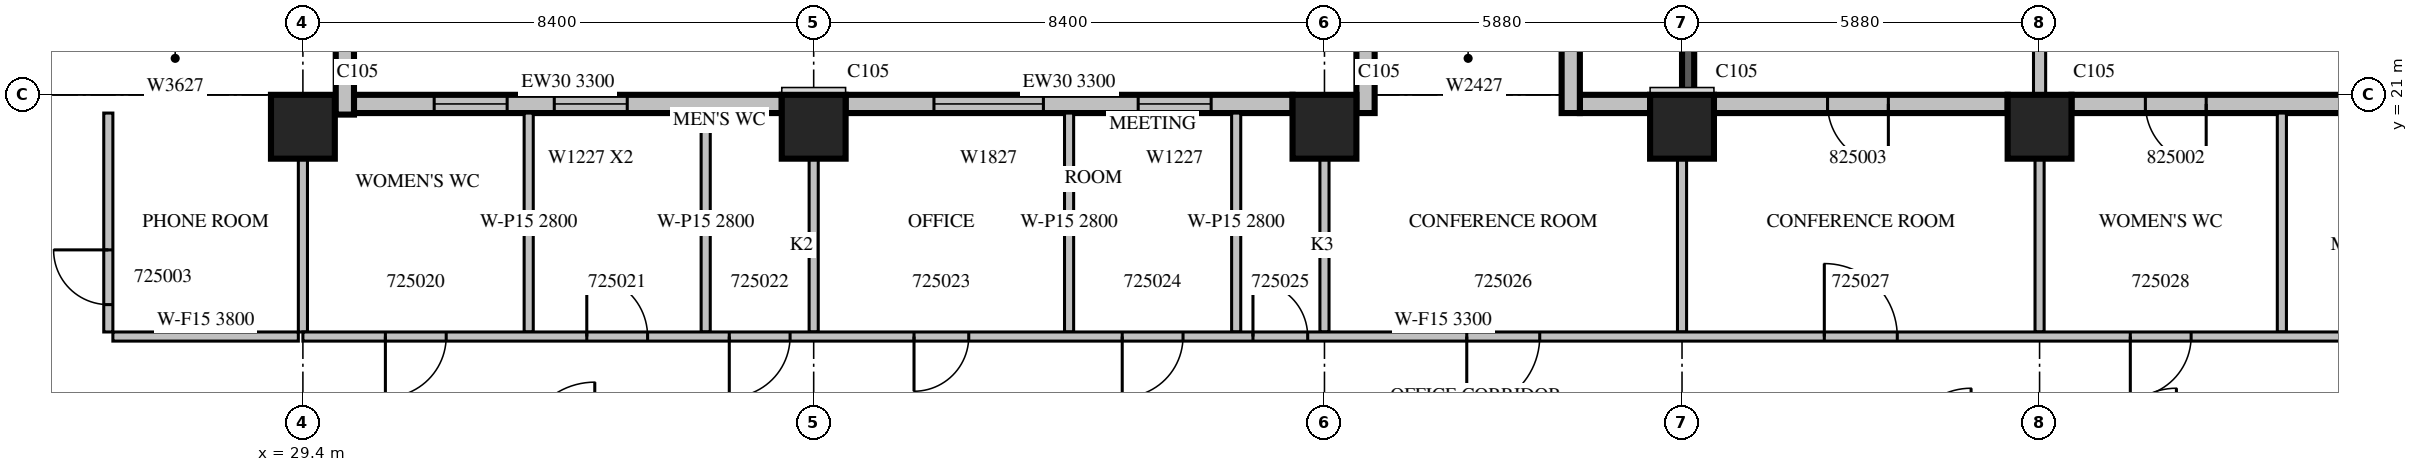
"""IFC4 building model, lengths in metres.
Left out: names, types, materials, properties, quantities, classifications, styles, units other than length and angle.
Written with IfcOpenShell. Run it as: python <this file> out.ifc"""

import sys

from ifc_helpers import new_model, si_unit, direction, frame, frame_2d, origin, origin_2d, place, context, subcontext, project, spatial, rectangle, extrude, source, transform, mapped, element, fill, save


model = new_model("IFC4")
c1 = context("Model", 3, precision=1e-05, world=origin(), true_north=direction((0.0, 1.0)))
c2 = subcontext(c1, "Body", "Model", "MODEL_VIEW")
j1 = project(units=[si_unit("LENGTHUNIT", "METRE"), si_unit("PLANEANGLEUNIT", "RADIAN")], contexts=[c1])
p1 = place(None, origin())
s1 = spatial("IfcSite", under=j1, at=p1, CompositionType="ELEMENT")
p2 = place(p1, origin())
s2 = spatial("IfcBuilding", under=s1, at=p2, CompositionType="ELEMENT")
p3 = place(p2, frame((0.0, 0.0, 116.1)))
s3 = spatial("IfcBuildingStorey", under=s2, at=p3, CompositionType="ELEMENT", Elevation=116.1)
m1 = source(origin(), c2, "Body", "SweptSolid", [
    extrude(rectangle(XDim=1.05, YDim=1.05, at=origin_2d()), origin(), (0.0, 0.0, 1.0), 4.2),
])
for number, where, z_axis, x_axis in (
    (1, (29.4, 20.475, 0.0), (0.0, 0.0, 1.0), (1.0, 0.0, 0.0)),
    (2, (37.8, 20.475, 0.0), (0.0, 0.0, 1.0), (1.0, 0.0, 0.0)),
    (3, (46.2, 20.475, 0.0), (0.0, 0.0, 1.0), (1.0, 0.0, 0.0)),
    (4, (52.08, 20.475, 0.0), (0.0, 0.0, 1.0), (1.0, 0.0, 0.0)),
    (5, (57.96, 20.475, 0.0), (0.0, 0.0, 1.0), (1.0, 0.0, 0.0)),
):
    element("IfcColumn", number, at=place(p3, frame(where, z_axis=z_axis, x_axis=x_axis)), inside=s3, PredefinedType="COLUMN", context=c2, shape_type="MappedRepresentation", body=[
        mapped(m1, transform((0.0, 0.0, 0.0), scale=1.0)),
    ])
m2 = source(origin(), c2, "Body", "SweptSolid", [
    extrude(rectangle(XDim=3.9, YDim=0.2, at=frame_2d((1.95, 0.0))), origin(), (0.0, 0.0, 1.0), 3.79),
])
p4 = place(p3, frame((57.96, 21.0, 0.0), z_axis=(0.0, 0.0, 1.0), x_axis=(0.0, 1.0, 0.0)))
e6 = element("IfcWall", 6, at=p4, inside=s3, PredefinedType="SOLIDWALL", context=c2, shape_type="MappedRepresentation", body=[
    mapped(m2, transform((0.0, 0.0, 0.0), scale=1.0)),
])
m3 = source(origin(), c2, "Body", "SweptSolid", [
    extrude(rectangle(XDim=3.9, YDim=0.2, at=frame_2d((1.95, 0.0))), origin(), (0.0, 0.0, 1.0), 3.79),
])
p5 = place(p3, frame((52.18, 21.0, 0.0), z_axis=(0.0, 0.0, 1.0), x_axis=(0.0, 1.0, 0.0)))
e7 = element("IfcWall", 7, at=p5, inside=s3, PredefinedType="SOLIDWALL", context=c2, shape_type="MappedRepresentation", body=[
    mapped(m3, transform((0.0, 0.0, 0.0), scale=1.0)),
])
m4 = source(origin(), c2, "Body", "SweptSolid", [
    extrude(rectangle(XDim=2.4, YDim=2.7, at=frame_2d((1.2, 1.35))), frame((0.0, 0.11, 0.0), z_axis=(0.0, -1.0, 0.0), x_axis=(1.0, 0.0, 0.0)), (0.0, 0.0, 1.0), 0.22),
])
p6 = place(p5, frame((0.75, 0.0, 0.6)))
e8 = element("IfcOpeningElement", 8, at=p6, cuts=e7, PredefinedType="OPENING", context=c2, shape_type="MappedRepresentation", body=[
    mapped(m4, transform((0.0, 0.0, 0.0), scale=1.0)),
])
m5 = source(origin(), c2, "Body", "SweptSolid", [
    extrude(rectangle(XDim=4.83, YDim=0.3, at=frame_2d((2.415, 0.0))), origin(), (0.0, 0.0, 1.0), 3.8),
])
p7 = place(p3, frame((63.315, 20.85, 0.0), z_axis=(0.0, 0.0, 1.0), x_axis=(-1.0, 0.0, 0.0)))
e9 = element("IfcWall", 9, at=p7, inside=s3, PredefinedType="STANDARD", context=c2, shape_type="MappedRepresentation", body=[
    mapped(m5, transform((0.0, 0.0, 0.0), scale=1.0)),
])
m6 = source(origin(), c2, "Body", "SweptSolid", [
    extrude(rectangle(XDim=1.0, YDim=2.1, at=frame_2d((0.5, 1.05))), frame((0.0, 0.16, 0.0), z_axis=(0.0, -1.0, 0.0), x_axis=(1.0, 0.0, 0.0)), (0.0, 0.0, 1.0), 0.32),
])
p8 = place(p7, frame((2.615, 0.0, 0.0)))
e10 = element("IfcOpeningElement", 10, at=p8, cuts=e9, PredefinedType="OPENING", context=c2, shape_type="MappedRepresentation", body=[
    mapped(m6, transform((0.0, 0.0, 0.0), scale=1.0)),
])
p9 = place(p3, frame((57.435, 20.85, 0.0), z_axis=(0.0, 0.0, 1.0), x_axis=(-1.0, 0.0, 0.0)))
e11 = element("IfcWall", 11, at=p9, inside=s3, PredefinedType="STANDARD", context=c2, shape_type="MappedRepresentation", body=[
    mapped(m5, transform((0.0, 0.0, 0.0), scale=1.0)),
])
p10 = place(p9, frame((1.962, 0.0, 0.0)))
e12 = element("IfcOpeningElement", 12, at=p10, cuts=e11, PredefinedType="OPENING", context=c2, shape_type="MappedRepresentation", body=[
    mapped(m6, transform((0.0, 0.0, 0.0), scale=1.0)),
])
p11 = place(p3, frame((51.555, 20.85, 0.0), z_axis=(0.0, 0.0, 1.0), x_axis=(-1.0, 0.0, 0.0)))
e13 = element("IfcWall", 13, at=p11, inside=s3, PredefinedType="STANDARD", context=c2, shape_type="SweptSolid", body=[
    extrude(rectangle(XDim=1.155, YDim=0.3, at=frame_2d((0.578, 0.0))), origin(), (0.0, 0.0, 1.0), 3.8),
])
m7 = source(origin(), c2, "Body", "SweptSolid", [
    extrude(rectangle(XDim=1.2, YDim=0.3, at=frame_2d((0.6, 0.0))), origin(), (0.0, 0.0, 1.0), 3.8),
])
for number, where, z_axis, x_axis in (
    (14, (50.25, 20.7, 0.0), (0.0, 0.0, 1.0), (0.0, 1.0, 0.0)),
    (15, (46.875, 20.7, 0.0), (0.0, 0.0, 1.0), (0.0, 1.0, 0.0)),
):
    element("IfcWall", number, at=place(p3, frame(where, z_axis=z_axis, x_axis=x_axis)), inside=s3, PredefinedType="STANDARD", context=c2, shape_type="MappedRepresentation", body=[
        mapped(m7, transform((0.0, 0.0, 0.0), scale=1.0)),
    ])
m8 = source(origin(), c2, "Body", "SweptSolid", [
    extrude(rectangle(XDim=7.35, YDim=0.3, at=frame_2d((3.675, 0.0))), origin(), (0.0, 0.0, 1.0), 3.3),
])
p12 = place(p3, frame((45.675, 20.85, 0.0), z_axis=(0.0, 0.0, 1.0), x_axis=(-1.0, 0.0, 0.0)))
e16 = element("IfcWall", 16, at=p12, inside=s3, PredefinedType="STANDARD", context=c2, shape_type="MappedRepresentation", body=[
    mapped(m8, transform((0.0, 0.0, 0.0), scale=1.0)),
])
m9 = source(origin(), c2, "Body", "SweptSolid", [
    extrude(rectangle(XDim=1.2, YDim=2.7, at=frame_2d((0.6, 1.35))), frame((0.0, 0.16, 0.0), z_axis=(0.0, -1.0, 0.0), x_axis=(1.0, 0.0, 0.0)), (0.0, 0.0, 1.0), 0.32),
])
p13 = place(p12, frame((1.339, 0.0, 0.6)))
e17 = element("IfcOpeningElement", 17, at=p13, cuts=e16, PredefinedType="OPENING", context=c2, shape_type="MappedRepresentation", body=[
    mapped(m9, transform((0.0, 0.0, 0.0), scale=1.0)),
])
m10 = source(origin(), c2, "Body", "SweptSolid", [
    extrude(rectangle(XDim=1.8, YDim=2.7, at=frame_2d((0.9, 1.35))), frame((0.0, 0.16, 0.0), z_axis=(0.0, -1.0, 0.0), x_axis=(1.0, 0.0, 0.0)), (0.0, 0.0, 1.0), 0.32),
])
p14 = place(p12, frame((4.097, 0.0, 0.6)))
e18 = element("IfcOpeningElement", 18, at=p14, cuts=e16, PredefinedType="OPENING", context=c2, shape_type="MappedRepresentation", body=[
    mapped(m10, transform((0.0, 0.0, 0.0), scale=1.0)),
])
p15 = place(p3, frame((37.275, 20.85, 0.0), z_axis=(0.0, 0.0, 1.0), x_axis=(-1.0, 0.0, 0.0)))
e19 = element("IfcWall", 19, at=p15, inside=s3, PredefinedType="STANDARD", context=c2, shape_type="SweptSolid", body=[
    extrude(rectangle(XDim=7.035, YDim=0.3, at=frame_2d((3.518, 0.0))), origin(), (0.0, 0.0, 1.0), 3.3),
])
p16 = place(p15, frame((2.541, 0.0, 0.6)))
e20 = element("IfcOpeningElement", 20, at=p16, cuts=e19, PredefinedType="OPENING", context=c2, shape_type="MappedRepresentation", body=[
    mapped(m9, transform((0.0, 0.0, 0.0), scale=1.0)),
])
p17 = place(p15, frame((4.516, 0.0, 0.6)))
e21 = element("IfcOpeningElement", 21, at=p17, cuts=e19, PredefinedType="OPENING", context=c2, shape_type="MappedRepresentation", body=[
    mapped(m9, transform((0.0, 0.0, 0.0), scale=1.0)),
])
p18 = place(p3, frame((30.09, 20.675, 0.0), z_axis=(0.0, 0.0, 1.0), x_axis=(0.0, 1.0, 0.0)))
e22 = element("IfcWall", 22, at=p18, inside=s3, PredefinedType="STANDARD", context=c2, shape_type="SweptSolid", body=[
    extrude(rectangle(XDim=1.225, YDim=0.3, at=frame_2d((0.613, 0.0))), origin(), (0.0, 0.0, 1.0), 3.8),
])
m11 = source(origin(), c2, "Body", "SweptSolid", [
    extrude(rectangle(XDim=3.6, YDim=0.15, at=frame_2d((1.8, 0.0))), origin(), (0.0, 0.0, 1.0), 3.8),
])
p19 = place(p3, frame((26.2, 20.7, 0.0), z_axis=(0.0, 0.0, 1.0), x_axis=(0.0, -1.0, 0.0)))
e23 = element("IfcWall", 23, at=p19, inside=s3, PredefinedType="PARTITIONING", context=c2, shape_type="MappedRepresentation", body=[
    mapped(m11, transform((0.0, 0.0, 0.0), scale=1.0)),
])
m12 = source(origin(), c2, "Body", "SweptSolid", [
    extrude(rectangle(XDim=0.9, YDim=2.1, at=frame_2d((0.45, 1.05))), frame((0.0, 0.085, 0.0), z_axis=(0.0, -1.0, 0.0), x_axis=(1.0, 0.0, 0.0)), (0.0, 0.0, 1.0), 0.17),
])
p20 = place(p19, frame((2.25, 0.0, 0.0)))
e24 = element("IfcOpeningElement", 24, at=p20, cuts=e23, PredefinedType="OPENING", context=c2, shape_type="MappedRepresentation", body=[
    mapped(m12, transform((0.0, 0.0, 0.0), scale=1.0)),
])
m13 = source(origin(), c2, "Body", "SweptSolid", [
    extrude(rectangle(XDim=3.05, YDim=0.15, at=frame_2d((1.525, 0.0))), origin(), (0.0, 0.0, 1.0), 3.8),
])
p21 = place(p3, frame((26.275, 17.025, 0.0), z_axis=(0.0, 0.0, 1.0), x_axis=(1.0, 0.0, 0.0)))
e25 = element("IfcWall", 25, at=p21, inside=s3, PredefinedType="PARTITIONING", context=c2, shape_type="MappedRepresentation", body=[
    mapped(m13, transform((0.0, 0.0, 0.0), scale=1.0)),
])
m14 = source(origin(), c2, "Body", "SweptSolid", [
    extrude(rectangle(XDim=2.851, YDim=0.15, at=frame_2d((1.425, 0.0))), origin(), (0.0, 0.0, 1.0), 3.8),
])
p22 = place(p3, frame((29.4, 17.1, 0.0), z_axis=(0.0, 0.0, 1.0), x_axis=(0.0, 1.0, 0.0)))
e26 = element("IfcWall", 26, at=p22, inside=s3, PredefinedType="PARTITIONING", context=c2, shape_type="MappedRepresentation", body=[
    mapped(m14, transform((0.0, 0.0, 0.0), scale=1.0)),
])
m15 = source(origin(), c2, "Body", "SweptSolid", [
    extrude(rectangle(XDim=3.6, YDim=0.15, at=frame_2d((1.8, 0.0))), origin(), (0.0, 0.0, 1.0), 2.8),
])
for number, where, z_axis, x_axis in (
    (27, (33.113, 20.7, 0.0), (0.0, 0.0, 1.0), (0.0, -1.0, 0.0)),
    (28, (36.024, 20.7, 0.0), (0.0, 0.0, 1.0), (0.0, -1.0, 0.0)),
    (29, (44.748, 20.7, 0.0), (0.0, 0.0, 1.0), (0.0, -1.0, 0.0)),
):
    element("IfcWall", number, at=place(p3, frame(where, z_axis=z_axis, x_axis=x_axis)), inside=s3, PredefinedType="PARTITIONING", context=c2, shape_type="MappedRepresentation", body=[
        mapped(m15, transform((0.0, 0.0, 0.0), scale=1.0)),
    ])
p23 = place(p3, frame((52.08, 19.951, 0.0), z_axis=(0.0, 0.0, 1.0), x_axis=(0.0, -1.0, 0.0)))
e30 = element("IfcWall", 30, at=p23, inside=s3, PredefinedType="PARTITIONING", context=c2, shape_type="MappedRepresentation", body=[
    mapped(m14, transform((0.0, 0.0, 0.0), scale=1.0)),
])
p24 = place(p3, frame((61.944, 20.7, 0.0), z_axis=(0.0, 0.0, 1.0), x_axis=(0.0, -1.0, 0.0)))
e31 = element("IfcWall", 31, at=p24, inside=s3, PredefinedType="PARTITIONING", context=c2, shape_type="MappedRepresentation", body=[
    mapped(m11, transform((0.0, 0.0, 0.0), scale=1.0)),
])
p25 = place(p3, frame((37.8, 17.1, 0.0), z_axis=(0.0, 0.0, 1.0), x_axis=(0.0, 1.0, 0.0)))
e32 = element("IfcWall", 32, at=p25, inside=s3, PredefinedType="PARTITIONING", context=c2, shape_type="MappedRepresentation", body=[
    mapped(m14, transform((0.0, 0.0, 0.0), scale=1.0)),
])
p26 = place(p3, frame((42.0, 17.1, 0.0), z_axis=(0.0, 0.0, 1.0), x_axis=(0.0, 1.0, 0.0)))
e33 = element("IfcWall", 33, at=p26, inside=s3, PredefinedType="PARTITIONING", context=c2, shape_type="MappedRepresentation", body=[
    mapped(m15, transform((0.0, 0.0, 0.0), scale=1.0)),
])
for number, where, z_axis, x_axis in (
    (34, (46.2, 17.1, 0.0), (0.0, 0.0, 1.0), (0.0, 1.0, 0.0)),
    (35, (57.96, 17.1, 0.0), (0.0, 0.0, 1.0), (0.0, 1.0, 0.0)),
):
    element("IfcWall", number, at=place(p3, frame(where, z_axis=z_axis, x_axis=x_axis)), inside=s3, PredefinedType="PARTITIONING", context=c2, shape_type="MappedRepresentation", body=[
        mapped(m14, transform((0.0, 0.0, 0.0), scale=1.0)),
    ])
m16 = source(origin(), c2, "Body", "SweptSolid", [
    extrude(rectangle(XDim=37.5, YDim=0.15, at=frame_2d((18.75, 0.0))), origin(), (0.0, 0.0, 1.0), 3.3),
])
p27 = place(p3, frame((29.4, 17.025, 0.0), z_axis=(0.0, 0.0, 1.0), x_axis=(1.0, 0.0, 0.0)))
e36 = element("IfcWall", 36, at=p27, inside=s3, PredefinedType="PARTITIONING", context=c2, shape_type="MappedRepresentation", body=[
    mapped(m16, transform((0.0, 0.0, 0.0), scale=1.0)),
])
m17 = source(origin(), c2, "Body", "SweptSolid", [
    extrude(rectangle(XDim=1.0, YDim=2.1, at=frame_2d((0.5, 1.05))), frame((0.0, 0.085, 0.0), z_axis=(0.0, -1.0, 0.0), x_axis=(1.0, 0.0, 0.0)), (0.0, 0.0, 1.0), 0.17),
])
p28 = place(p27, frame((1.357, 0.0, 0.0)))
e37 = element("IfcOpeningElement", 37, at=p28, cuts=e36, PredefinedType="OPENING", context=c2, shape_type="MappedRepresentation", body=[
    mapped(m17, transform((0.0, 0.0, 0.0), scale=1.0)),
])
p29 = place(p27, frame((4.669, 0.0, 0.0)))
e38 = element("IfcOpeningElement", 38, at=p29, cuts=e36, PredefinedType="OPENING", context=c2, shape_type="MappedRepresentation", body=[
    mapped(m17, transform((0.0, 0.0, 0.0), scale=1.0)),
])
p30 = place(p27, frame((7.012, 0.0, 0.0)))
e39 = element("IfcOpeningElement", 39, at=p30, cuts=e36, PredefinedType="OPENING", context=c2, shape_type="MappedRepresentation", body=[
    mapped(m17, transform((0.0, 0.0, 0.0), scale=1.0)),
])
p31 = place(p27, frame((10.05, 0.0, 0.0)))
e40 = element("IfcOpeningElement", 40, at=p31, cuts=e36, PredefinedType="OPENING", context=c2, shape_type="MappedRepresentation", body=[
    mapped(m12, transform((0.0, 0.0, 0.0), scale=1.0)),
])
p32 = place(p27, frame((13.474, 0.0, 0.0)))
e41 = element("IfcOpeningElement", 41, at=p32, cuts=e36, PredefinedType="OPENING", context=c2, shape_type="MappedRepresentation", body=[
    mapped(m17, transform((0.0, 0.0, 0.0), scale=1.0)),
])
p33 = place(p27, frame((15.624, 0.0, 0.0)))
e42 = element("IfcOpeningElement", 42, at=p33, cuts=e36, PredefinedType="OPENING", context=c2, shape_type="MappedRepresentation", body=[
    mapped(m12, transform((0.0, 0.0, 0.0), scale=1.0)),
])
m18 = source(origin(), c2, "Body", "SweptSolid", [
    extrude(rectangle(XDim=1.2, YDim=2.1, at=frame_2d((0.6, 1.05))), frame((0.0, 0.085, 0.0), z_axis=(0.0, -1.0, 0.0), x_axis=(1.0, 0.0, 0.0)), (0.0, 0.0, 1.0), 0.17),
])
p34 = place(p27, frame((19.14, 0.0, 0.0)))
e43 = element("IfcOpeningElement", 43, at=p34, cuts=e36, PredefinedType="OPENING", context=c2, shape_type="MappedRepresentation", body=[
    mapped(m18, transform((0.0, 0.0, 0.0), scale=1.0)),
])
p35 = place(p27, frame((25.02, 0.0, 0.0)))
e44 = element("IfcOpeningElement", 44, at=p35, cuts=e36, PredefinedType="OPENING", context=c2, shape_type="MappedRepresentation", body=[
    mapped(m18, transform((0.0, 0.0, 0.0), scale=1.0)),
])
p36 = place(p27, frame((30.052, 0.0, 0.0)))
e45 = element("IfcOpeningElement", 45, at=p36, cuts=e36, PredefinedType="OPENING", context=c2, shape_type="MappedRepresentation", body=[
    mapped(m17, transform((0.0, 0.0, 0.0), scale=1.0)),
])
p37 = place(p27, frame((33.608, 0.0, 0.0)))
e46 = element("IfcOpeningElement", 46, at=p37, cuts=e36, PredefinedType="OPENING", context=c2, shape_type="MappedRepresentation", body=[
    mapped(m17, transform((0.0, 0.0, 0.0), scale=1.0)),
])
p38 = place(p27, frame((36.124, 0.0, 0.0)))
e47 = element("IfcOpeningElement", 47, at=p38, cuts=e36, PredefinedType="OPENING", context=c2, shape_type="MappedRepresentation", body=[
    mapped(m17, transform((0.0, 0.0, 0.0), scale=1.0)),
])
m19 = source(origin(), c2, "Body", "SweptSolid", [
    extrude(rectangle(XDim=1.2, YDim=2.7, at=frame_2d((0.6, 1.35))), frame((0.0, 0.03, 0.0), z_axis=(0.0, -1.0, 0.0), x_axis=(1.0, 0.0, 0.0)), (0.0, 0.0, 1.0), 0.06),
])
p39 = place(p13, origin())
e48 = element("IfcWindow", 48, at=p39, inside=s3, PartitioningType="SINGLE_PANEL", PredefinedType="WINDOW", context=c2, shape_type="MappedRepresentation", body=[
    mapped(m19, transform((0.0, 0.0, 0.0), scale=1.0)),
])
fill(e17, e48)
p40 = place(p16, origin())
e49 = element("IfcWindow", 49, at=p40, inside=s3, PartitioningType="SINGLE_PANEL", PredefinedType="WINDOW", context=c2, shape_type="MappedRepresentation", body=[
    mapped(m19, transform((0.0, 0.0, 0.0), scale=1.0)),
])
fill(e20, e49)
p41 = place(p17, origin())
e50 = element("IfcWindow", 50, at=p41, inside=s3, PartitioningType="SINGLE_PANEL", PredefinedType="WINDOW", context=c2, shape_type="MappedRepresentation", body=[
    mapped(m19, transform((0.0, 0.0, 0.0), scale=1.0)),
])
fill(e21, e50)
m20 = source(origin(), c2, "Body", "SweptSolid", [
    extrude(rectangle(XDim=1.8, YDim=2.7, at=frame_2d((0.9, 1.35))), frame((0.0, 0.03, 0.0), z_axis=(0.0, -1.0, 0.0), x_axis=(1.0, 0.0, 0.0)), (0.0, 0.0, 1.0), 0.06),
])
p42 = place(p14, origin())
e51 = element("IfcWindow", 51, at=p42, inside=s3, PartitioningType="SINGLE_PANEL", PredefinedType="WINDOW", context=c2, shape_type="MappedRepresentation", body=[
    mapped(m20, transform((0.0, 0.0, 0.0), scale=1.0)),
])
fill(e18, e51)
m21 = source(origin(), c2, "Body", "SweptSolid", [
    extrude(rectangle(XDim=0.9, YDim=2.1, at=frame_2d((0.45, 1.05))), frame((0.0, 0.025, 0.0), z_axis=(0.0, -1.0, 0.0), x_axis=(1.0, 0.0, 0.0)), (0.0, 0.0, 1.0), 0.05),
])
p43 = place(p20, origin())
e52 = element("IfcDoor", 52, at=p43, inside=s3, OperationType="SINGLE_SWING_RIGHT", PredefinedType="DOOR", context=c2, shape_type="MappedRepresentation", body=[
    mapped(m21, transform((0.0, 0.0, 0.0), scale=1.0)),
])
fill(e24, e52)
m22 = source(origin(), c2, "Body", "SweptSolid", [
    extrude(rectangle(XDim=1.0, YDim=2.1, at=frame_2d((0.5, 1.05))), frame((0.0, 0.025, 0.0), z_axis=(0.0, -1.0, 0.0), x_axis=(1.0, 0.0, 0.0)), (0.0, 0.0, 1.0), 0.05),
])
p44 = place(p28, origin())
e53 = element("IfcDoor", 53, at=p44, inside=s3, OperationType="SINGLE_SWING_RIGHT", PredefinedType="DOOR", context=c2, shape_type="MappedRepresentation", body=[
    mapped(m22, transform((0.0, 0.0, 0.0), scale=1.0)),
])
fill(e37, e53)
p45 = place(p29, origin())
e54 = element("IfcDoor", 54, at=p45, inside=s3, OperationType="SINGLE_SWING_LEFT", PredefinedType="DOOR", context=c2, shape_type="MappedRepresentation", body=[
    mapped(m22, transform((0.0, 0.0, 0.0), scale=1.0)),
])
fill(e38, e54)
p46 = place(p30, origin())
e55 = element("IfcDoor", 55, at=p46, inside=s3, OperationType="SINGLE_SWING_RIGHT", PredefinedType="DOOR", context=c2, shape_type="MappedRepresentation", body=[
    mapped(m22, transform((0.0, 0.0, 0.0), scale=1.0)),
])
fill(e39, e55)
p47 = place(p31, origin())
e56 = element("IfcDoor", 56, at=p47, inside=s3, OperationType="SINGLE_SWING_RIGHT", PredefinedType="DOOR", context=c2, shape_type="MappedRepresentation", body=[
    mapped(m21, transform((0.0, 0.0, 0.0), scale=1.0)),
])
fill(e40, e56)
p48 = place(p32, origin())
e57 = element("IfcDoor", 57, at=p48, inside=s3, OperationType="SINGLE_SWING_RIGHT", PredefinedType="DOOR", context=c2, shape_type="MappedRepresentation", body=[
    mapped(m22, transform((0.0, 0.0, 0.0), scale=1.0)),
])
fill(e41, e57)
p49 = place(p33, origin())
e58 = element("IfcDoor", 58, at=p49, inside=s3, OperationType="SINGLE_SWING_LEFT", PredefinedType="DOOR", context=c2, shape_type="MappedRepresentation", body=[
    mapped(m21, transform((0.0, 0.0, 0.0), scale=1.0)),
])
fill(e42, e58)
m23 = source(origin(), c2, "Body", "SweptSolid", [
    extrude(rectangle(XDim=1.2, YDim=2.1, at=frame_2d((0.6, 1.05))), frame((0.0, 0.025, 0.0), z_axis=(0.0, -1.0, 0.0), x_axis=(1.0, 0.0, 0.0)), (0.0, 0.0, 1.0), 0.05),
])
p50 = place(p34, origin())
e59 = element("IfcDoor", 59, at=p50, inside=s3, OperationType="SINGLE_SWING_RIGHT", PredefinedType="DOOR", context=c2, shape_type="MappedRepresentation", body=[
    mapped(m23, transform((0.0, 0.0, 0.0), scale=1.0)),
])
fill(e43, e59)
p51 = place(p35, origin())
e60 = element("IfcDoor", 60, at=p51, inside=s3, OperationType="SINGLE_SWING_LEFT", PredefinedType="DOOR", context=c2, shape_type="MappedRepresentation", body=[
    mapped(m23, transform((0.0, 0.0, 0.0), scale=1.0)),
])
fill(e44, e60)
p52 = place(p36, origin())
e61 = element("IfcDoor", 61, at=p52, inside=s3, OperationType="SINGLE_SWING_RIGHT", PredefinedType="DOOR", context=c2, shape_type="MappedRepresentation", body=[
    mapped(m22, transform((0.0, 0.0, 0.0), scale=1.0)),
])
fill(e45, e61)
p53 = place(p8, origin())
e62 = element("IfcDoor", 62, at=p53, inside=s3, OperationType="SINGLE_SWING_LEFT", PredefinedType="DOOR", context=c2, shape_type="MappedRepresentation", body=[
    mapped(m22, transform((0.0, 0.0, 0.0), scale=1.0)),
])
fill(e10, e62)
p54 = place(p10, origin())
e63 = element("IfcDoor", 63, at=p54, inside=s3, OperationType="SINGLE_SWING_LEFT", PredefinedType="DOOR", context=c2, shape_type="MappedRepresentation", body=[
    mapped(m22, transform((0.0, 0.0, 0.0), scale=1.0)),
])
fill(e12, e63)
save(model, sys.argv[1])
